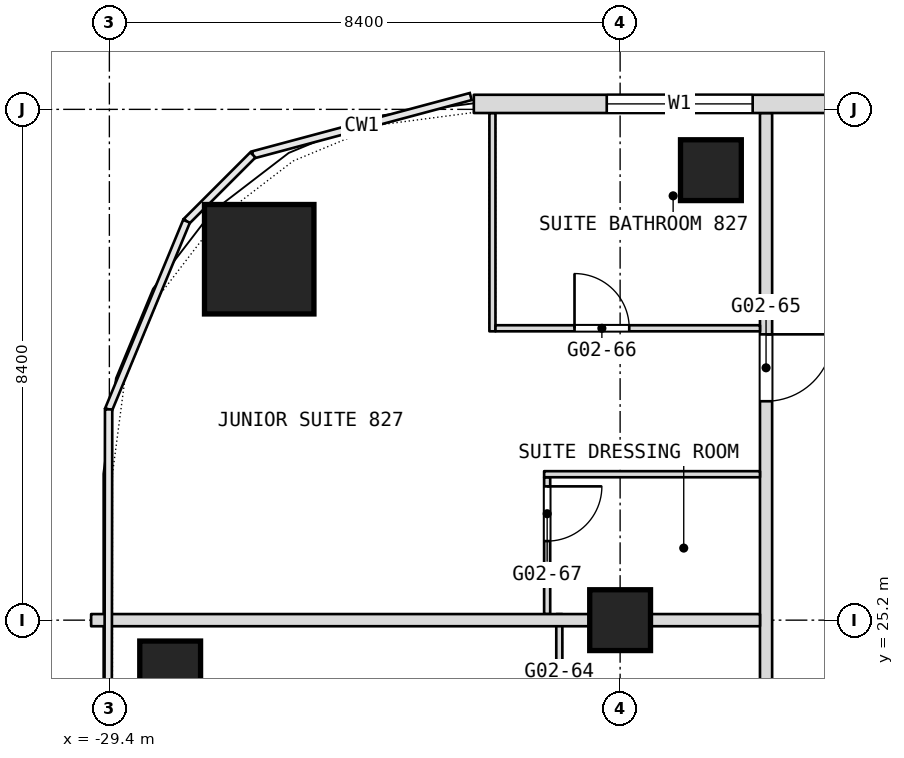
"""IFC4 building model, lengths in metres.
Left out: names, types, materials, properties, quantities, classifications, styles, units other than length and angle.
Written with IfcOpenShell. Run it as: python <this file> out.ifc"""

import sys

from ifc_helpers import new_model, si_unit, direction, frame, frame_2d, origin, origin_2d, place, context, subcontext, project, spatial, rectangle, extrude, element, fill, save


model = new_model("IFC4")
c1 = context("Model", 3, precision=1e-05, world=origin(), true_north=direction((0.0, 1.0)))
c2 = subcontext(c1, "Body", "Model", "MODEL_VIEW")
j1 = project(units=[si_unit("LENGTHUNIT", "METRE"), si_unit("PLANEANGLEUNIT", "RADIAN")], contexts=[c1])
p1 = place(None, origin())
s1 = spatial("IfcSite", under=j1, at=p1, CompositionType="ELEMENT")
p2 = place(p1, origin())
s2 = spatial("IfcBuilding", under=s1, at=p2, CompositionType="ELEMENT")
p3 = place(p2, frame((0.0, 0.0, 43.7)))
s3 = spatial("IfcBuildingStorey", under=s2, at=p3, CompositionType="ELEMENT", Elevation=43.7)
p4 = place(p3, frame((-26.936, 31.135, 0.0), z_axis=(0.0, 0.0, 1.0), x_axis=(1.0, 0.0, 0.0)))
e1 = element("IfcColumn", 1, at=p4, inside=s3, PredefinedType="COLUMN", context=c2, shape_type="SweptSolid", body=[
    extrude(rectangle(XDim=1.8, YDim=1.8, at=origin_2d()), origin(), (0.0, 0.0, 1.0), 3.6),
])
for number, where, z_axis, x_axis in (
    (2, (-21.0, 25.2, 0.0), (0.0, 0.0, 1.0), (1.0, 0.0, 0.0)),
    (3, (-28.4, 24.356, 0.0), (0.0, 0.0, 1.0), (1.0, 0.0, 0.0)),
    (4, (-19.507, 32.6, 0.0), (0.0, 0.0, 1.0), (1.0, 0.0, 0.0)),
):
    element("IfcColumn", number, at=place(p3, frame(where, z_axis=z_axis, x_axis=x_axis)), inside=s3, PredefinedType="COLUMN", context=c2, shape_type="SweptSolid", body=[
        extrude(rectangle(XDim=1.0, YDim=1.0, at=origin_2d()), origin(), (0.0, 0.0, 1.0), 3.6),
    ])
p5 = place(p3, frame((-18.6, 18.5, 0.0), z_axis=(0.0, 0.0, 1.0), x_axis=(0.0, 1.0, 0.0)))
e5 = element("IfcWall", 5, at=p5, inside=s3, PredefinedType="PARTITIONING", context=c2, shape_type="SweptSolid", body=[
    extrude(rectangle(XDim=15.04, YDim=0.2, at=frame_2d((7.52, 0.0))), origin(), (0.0, 0.0, 1.0), 3.34),
])
p6 = place(p5, frame((2.9, 0.0, 0.0)))
e6 = element("IfcOpeningElement", 6, at=p6, cuts=e5, PredefinedType="OPENING", context=c2, shape_type="SweptSolid", body=[
    extrude(rectangle(XDim=1.0, YDim=2.1, at=frame_2d((0.5, 1.05))), frame((0.0, 0.1, 0.0), z_axis=(0.0, -1.0, 0.0), x_axis=(1.0, 0.0, 0.0)), (0.0, 0.0, 1.0), 0.2),
])
p7 = place(p5, frame((10.3, 0.0, 0.0)))
e7 = element("IfcOpeningElement", 7, at=p7, cuts=e5, PredefinedType="OPENING", context=c2, shape_type="SweptSolid", body=[
    extrude(rectangle(XDim=1.1, YDim=2.1, at=frame_2d((0.55, 1.05))), frame((0.0, 0.1, 0.0), z_axis=(0.0, -1.0, 0.0), x_axis=(1.0, 0.0, 0.0)), (0.0, 0.0, 1.0), 0.2),
])
p8 = place(p3, frame((-22.0, 22.75, 0.0), z_axis=(0.0, 0.0, 1.0), x_axis=(0.0, 1.0, 0.0)))
e8 = element("IfcWall", 8, at=p8, inside=s3, PredefinedType="PARTITIONING", context=c2, shape_type="SweptSolid", body=[
    extrude(rectangle(XDim=2.55, YDim=0.1, at=frame_2d((1.275, 0.0))), origin(), (0.0, 0.0, 1.0), 3.34),
])
p9 = place(p8, frame((0.15, 0.0, 0.0)))
e9 = element("IfcOpeningElement", 9, at=p9, cuts=e8, PredefinedType="OPENING", context=c2, shape_type="SweptSolid", body=[
    extrude(rectangle(XDim=0.9, YDim=2.1, at=frame_2d((0.45, 1.05))), frame((0.0, 0.05, 0.0), z_axis=(0.0, -1.0, 0.0), x_axis=(1.0, 0.0, 0.0)), (0.0, 0.0, 1.0), 0.1),
])
p10 = place(p3, frame((-22.2, 25.3, 0.0), z_axis=(0.0, 0.0, 1.0), x_axis=(0.0, 1.0, 0.0)))
e10 = element("IfcWall", 10, at=p10, inside=s3, PredefinedType="PARTITIONING", context=c2, shape_type="SweptSolid", body=[
    extrude(rectangle(XDim=2.25, YDim=0.1, at=frame_2d((1.125, 0.0))), origin(), (0.0, 0.0, 1.0), 3.34),
])
p11 = place(p10, frame((1.2, 0.0, 0.0)))
e11 = element("IfcOpeningElement", 11, at=p11, cuts=e10, PredefinedType="OPENING", context=c2, shape_type="SweptSolid", body=[
    extrude(rectangle(XDim=0.9, YDim=2.1, at=frame_2d((0.45, 1.05))), frame((0.0, 0.05, 0.0), z_axis=(0.0, -1.0, 0.0), x_axis=(1.0, 0.0, 0.0)), (0.0, 0.0, 1.0), 0.1),
])
p12 = place(p3, frame((-23.1, 29.95, 0.0), z_axis=(0.0, 0.0, 1.0), x_axis=(0.0, 1.0, 0.0)))
e12 = element("IfcWall", 12, at=p12, inside=s3, PredefinedType="PARTITIONING", context=c2, shape_type="SweptSolid", body=[
    extrude(rectangle(XDim=3.59, YDim=0.1, at=frame_2d((1.795, 0.0))), origin(), (0.0, 0.0, 1.0), 3.34),
])
p13 = place(p3, frame((-29.7, 25.2, 0.0), z_axis=(0.0, 0.0, 1.0), x_axis=(1.0, 0.0, 0.0)))
e13 = element("IfcWall", 13, at=p13, inside=s3, PredefinedType="PARTITIONING", context=c2, shape_type="SweptSolid", body=[
    extrude(rectangle(XDim=11.0, YDim=0.2, at=frame_2d((5.5, 0.0))), origin(), (0.0, 0.0, 1.0), 2.84),
])
p14 = place(p3, frame((-22.25, 27.6, 0.0), z_axis=(0.0, 0.0, 1.0), x_axis=(1.0, 0.0, 0.0)))
e14 = element("IfcWall", 14, at=p14, inside=s3, PredefinedType="PARTITIONING", context=c2, shape_type="SweptSolid", body=[
    extrude(rectangle(XDim=3.55, YDim=0.1, at=frame_2d((1.775, 0.0))), origin(), (0.0, 0.0, 1.0), 3.34),
])
p15 = place(p3, frame((-23.05, 30.0, 0.0), z_axis=(0.0, 0.0, 1.0), x_axis=(1.0, 0.0, 0.0)))
e15 = element("IfcWall", 15, at=p15, inside=s3, PredefinedType="PARTITIONING", context=c2, shape_type="SweptSolid", body=[
    extrude(rectangle(XDim=4.35, YDim=0.1, at=frame_2d((2.175, 0.0))), origin(), (0.0, 0.0, 1.0), 3.34),
])
p16 = place(p15, frame((1.3, 0.0, 0.0)))
e16 = element("IfcOpeningElement", 16, at=p16, cuts=e15, PredefinedType="OPENING", context=c2, shape_type="SweptSolid", body=[
    extrude(rectangle(XDim=0.9, YDim=2.1, at=frame_2d((0.45, 1.05))), frame((0.0, 0.05, 0.0), z_axis=(0.0, -1.0, 0.0), x_axis=(1.0, 0.0, 0.0)), (0.0, 0.0, 1.0), 0.1),
])
p17 = place(p3, frame((23.406, 33.69, 0.0), z_axis=(0.0, 0.0, 1.0), x_axis=(-1.0, 0.0, 0.0)))
e17 = element("IfcWall", 17, at=p17, inside=s3, PredefinedType="NOTDEFINED", context=c2, shape_type="SweptSolid", body=[
    extrude(rectangle(XDim=46.812, YDim=0.3, at=frame_2d((23.406, 0.0))), origin(), (0.0, 0.0, 1.0), 3.6),
])
p18 = place(p17, frame((2.186, 0.0, 0.9)))
e18 = element("IfcOpeningElement", 18, at=p18, cuts=e17, PredefinedType="OPENING", context=c2, shape_type="SweptSolid", body=[
    extrude(rectangle(XDim=2.4, YDim=2.1, at=frame_2d((1.2, 1.05))), frame((0.0, 0.15, 0.0), z_axis=(0.0, -1.0, 0.0), x_axis=(1.0, 0.0, 0.0)), (0.0, 0.0, 1.0), 0.3),
])
p19 = place(p17, frame((7.506, 0.0, 0.9)))
e19 = element("IfcOpeningElement", 19, at=p19, cuts=e17, PredefinedType="OPENING", context=c2, shape_type="SweptSolid", body=[
    extrude(rectangle(XDim=2.4, YDim=2.1, at=frame_2d((1.2, 1.05))), frame((0.0, 0.15, 0.0), z_axis=(0.0, -1.0, 0.0), x_axis=(1.0, 0.0, 0.0)), (0.0, 0.0, 1.0), 0.3),
])
p20 = place(p17, frame((11.706, 0.0, 0.9)))
e20 = element("IfcOpeningElement", 20, at=p20, cuts=e17, PredefinedType="OPENING", context=c2, shape_type="SweptSolid", body=[
    extrude(rectangle(XDim=2.4, YDim=2.1, at=frame_2d((1.2, 1.05))), frame((0.0, 0.15, 0.0), z_axis=(0.0, -1.0, 0.0), x_axis=(1.0, 0.0, 0.0)), (0.0, 0.0, 1.0), 0.3),
])
p21 = place(p17, frame((15.906, 0.0, 0.9)))
e21 = element("IfcOpeningElement", 21, at=p21, cuts=e17, PredefinedType="OPENING", context=c2, shape_type="SweptSolid", body=[
    extrude(rectangle(XDim=2.4, YDim=2.1, at=frame_2d((1.2, 1.05))), frame((0.0, 0.15, 0.0), z_axis=(0.0, -1.0, 0.0), x_axis=(1.0, 0.0, 0.0)), (0.0, 0.0, 1.0), 0.3),
])
p22 = place(p17, frame((20.106, 0.0, 0.9)))
e22 = element("IfcOpeningElement", 22, at=p22, cuts=e17, PredefinedType="OPENING", context=c2, shape_type="SweptSolid", body=[
    extrude(rectangle(XDim=2.4, YDim=2.1, at=frame_2d((1.2, 1.05))), frame((0.0, 0.15, 0.0), z_axis=(0.0, -1.0, 0.0), x_axis=(1.0, 0.0, 0.0)), (0.0, 0.0, 1.0), 0.3),
])
p23 = place(p17, frame((24.306, 0.0, 0.9)))
e23 = element("IfcOpeningElement", 23, at=p23, cuts=e17, PredefinedType="OPENING", context=c2, shape_type="SweptSolid", body=[
    extrude(rectangle(XDim=2.4, YDim=2.1, at=frame_2d((1.2, 1.05))), frame((0.0, 0.15, 0.0), z_axis=(0.0, -1.0, 0.0), x_axis=(1.0, 0.0, 0.0)), (0.0, 0.0, 1.0), 0.3),
])
p24 = place(p17, frame((28.506, 0.0, 0.9)))
e24 = element("IfcOpeningElement", 24, at=p24, cuts=e17, PredefinedType="OPENING", context=c2, shape_type="SweptSolid", body=[
    extrude(rectangle(XDim=2.4, YDim=2.1, at=frame_2d((1.2, 1.05))), frame((0.0, 0.15, 0.0), z_axis=(0.0, -1.0, 0.0), x_axis=(1.0, 0.0, 0.0)), (0.0, 0.0, 1.0), 0.3),
])
p25 = place(p17, frame((32.706, 0.0, 0.9)))
e25 = element("IfcOpeningElement", 25, at=p25, cuts=e17, PredefinedType="OPENING", context=c2, shape_type="SweptSolid", body=[
    extrude(rectangle(XDim=2.4, YDim=2.1, at=frame_2d((1.2, 1.05))), frame((0.0, 0.15, 0.0), z_axis=(0.0, -1.0, 0.0), x_axis=(1.0, 0.0, 0.0)), (0.0, 0.0, 1.0), 0.3),
])
p26 = place(p17, frame((36.906, 0.0, 0.9)))
e26 = element("IfcOpeningElement", 26, at=p26, cuts=e17, PredefinedType="OPENING", context=c2, shape_type="SweptSolid", body=[
    extrude(rectangle(XDim=2.4, YDim=2.1, at=frame_2d((1.2, 1.05))), frame((0.0, 0.15, 0.0), z_axis=(0.0, -1.0, 0.0), x_axis=(1.0, 0.0, 0.0)), (0.0, 0.0, 1.0), 0.3),
])
p27 = place(p17, frame((42.226, 0.0, 0.9)))
e27 = element("IfcOpeningElement", 27, at=p27, cuts=e17, PredefinedType="OPENING", context=c2, shape_type="SweptSolid", body=[
    extrude(rectangle(XDim=2.4, YDim=2.1, at=frame_2d((1.2, 1.05))), frame((0.0, 0.15, 0.0), z_axis=(0.0, -1.0, 0.0), x_axis=(1.0, 0.0, 0.0)), (0.0, 0.0, 1.0), 0.3),
])
p28 = place(p7, origin())
e28 = element("IfcDoor", 28, at=p28, inside=s3, OperationType="SINGLE_SWING_RIGHT", PredefinedType="DOOR", context=c2, shape_type="SweptSolid", body=[
    extrude(rectangle(XDim=1.1, YDim=2.1, at=frame_2d((0.55, 1.05))), frame((0.0, 0.025, 0.0), z_axis=(0.0, -1.0, 0.0), x_axis=(1.0, 0.0, 0.0)), (0.0, 0.0, 1.0), 0.05),
])
fill(e7, e28)
p29 = place(p11, origin())
e29 = element("IfcDoor", 29, at=p29, inside=s3, OperationType="SINGLE_SWING_LEFT", PredefinedType="DOOR", context=c2, shape_type="SweptSolid", body=[
    extrude(rectangle(XDim=0.9, YDim=2.1, at=frame_2d((0.45, 1.05))), frame((0.0, 0.025, 0.0), z_axis=(0.0, -1.0, 0.0), x_axis=(1.0, 0.0, 0.0)), (0.0, 0.0, 1.0), 0.05),
])
fill(e11, e29)
p30 = place(p16, origin())
e30 = element("IfcDoor", 30, at=p30, inside=s3, OperationType="SINGLE_SWING_LEFT", PredefinedType="DOOR", context=c2, shape_type="SweptSolid", body=[
    extrude(rectangle(XDim=0.9, YDim=2.1, at=frame_2d((0.45, 1.05))), frame((0.0, 0.025, 0.0), z_axis=(0.0, -1.0, 0.0), x_axis=(1.0, 0.0, 0.0)), (0.0, 0.0, 1.0), 0.05),
])
fill(e16, e30)
p31 = place(p27, origin())
e31 = element("IfcWindow", 31, at=p31, inside=s3, PartitioningType="SINGLE_PANEL", PredefinedType="WINDOW", context=c2, shape_type="SweptSolid", body=[
    extrude(rectangle(XDim=2.4, YDim=2.1, at=frame_2d((1.2, 1.05))), frame((0.0, 0.03, 0.0), z_axis=(0.0, -1.0, 0.0), x_axis=(1.0, 0.0, 0.0)), (0.0, 0.0, 1.0), 0.06),
])
fill(e27, e31)
save(model, sys.argv[1])
